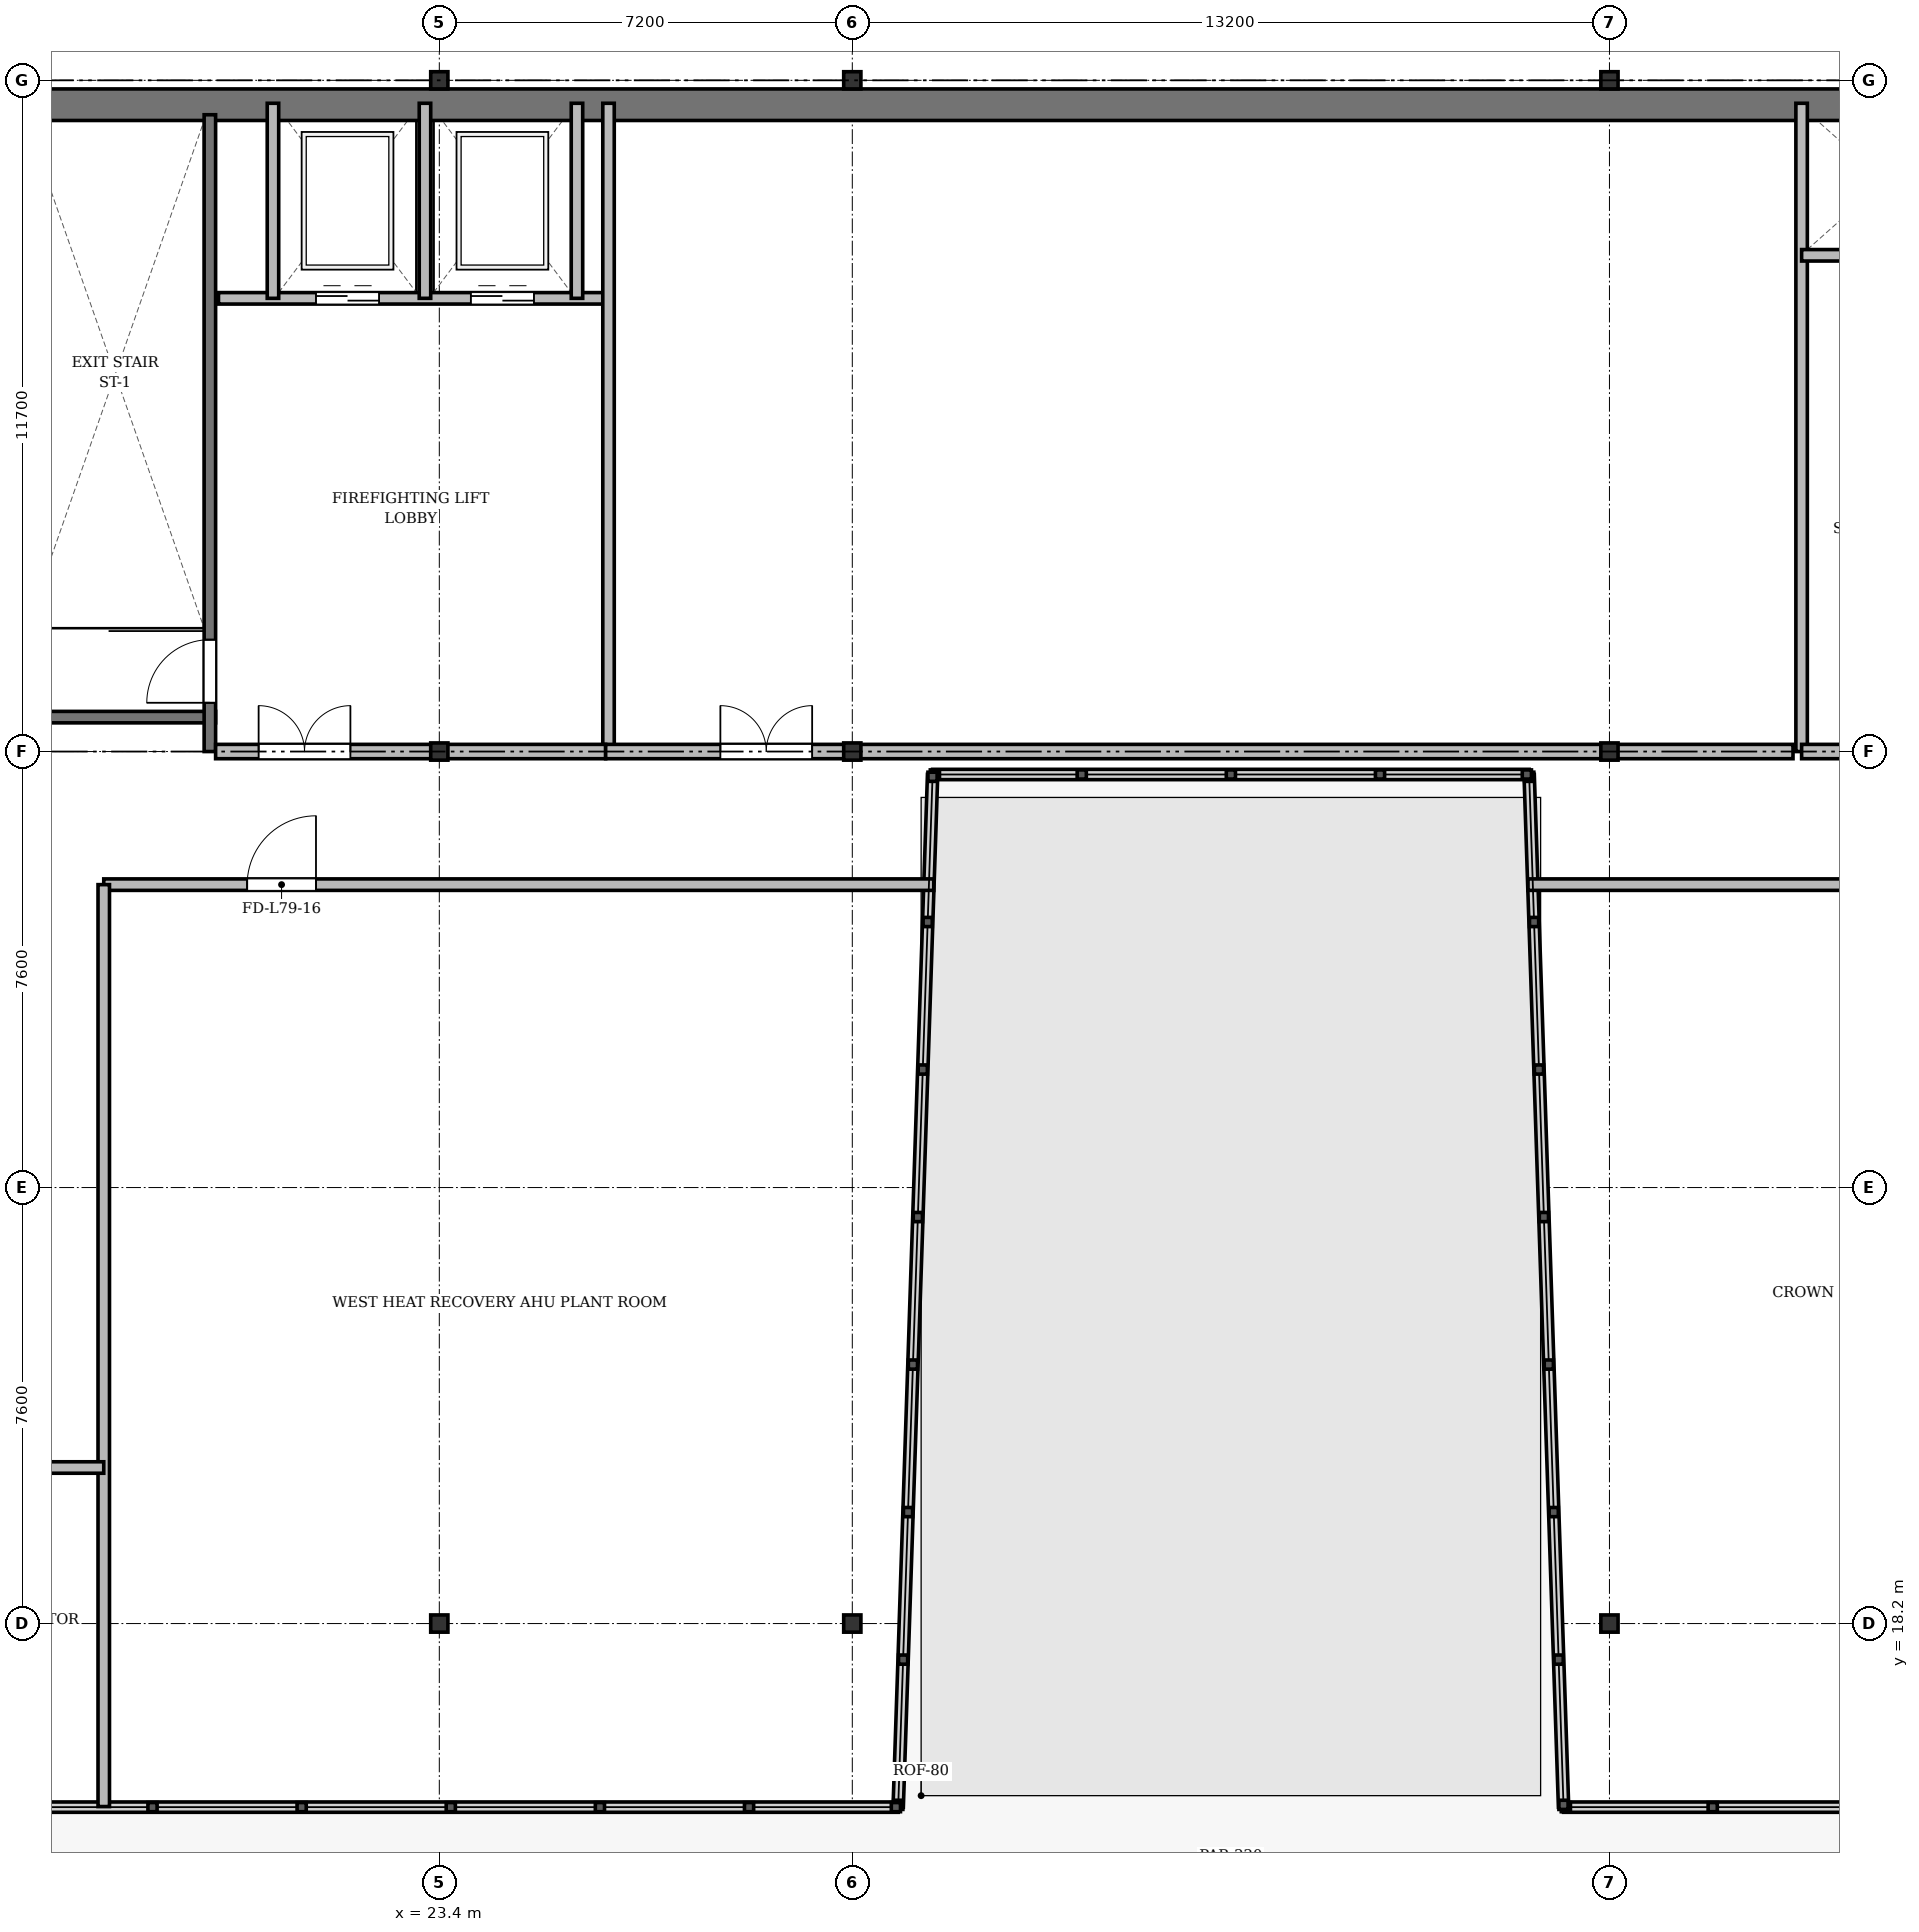
"""IFC4 building model, lengths in metres.
Left out: names, types, materials, properties, quantities, classifications, styles, units other than length and angle.
Written with IfcOpenShell. Run it as: python <this file> out.ifc"""

import sys

from ifc_helpers import new_model, si_unit, direction, frame, frame_2d, origin, origin_2d, place, context, subcontext, project, spatial, rectangle, i_section, extrude, source, transform, mapped, element, fill, save


model = new_model("IFC4")
c1 = context("Model", 3, precision=1e-05, world=origin(), true_north=direction((0.0, 1.0)))
c2 = subcontext(c1, "Body", "Model", "MODEL_VIEW")
j1 = project(units=[si_unit("LENGTHUNIT", "METRE"), si_unit("PLANEANGLEUNIT", "RADIAN")], contexts=[c1])
p1 = place(None, origin())
s1 = spatial("IfcSite", under=j1, at=p1, CompositionType="ELEMENT")
p2 = place(p1, origin())
s2 = spatial("IfcBuilding", under=s1, at=p2, CompositionType="ELEMENT")
p3 = place(p2, frame((0.0, 0.0, 303.5)))
s3 = spatial("IfcBuildingStorey", under=s2, at=p3, CompositionType="ELEMENT", Elevation=303.5)
m1 = source(origin(), c2, "Body", "SweptSolid", [
    extrude(i_section(OverallWidth=0.3, OverallDepth=0.3, WebThickness=0.015, FlangeThickness=0.024, at=origin_2d()), origin(), (0.0, 0.0, 1.0), 4.4),
])
for number, where, z_axis, x_axis in (
    (1, (23.4, 18.2, 0.0), (0.0, 0.0, 1.0), (1.0, 0.0, 0.0)),
    (2, (23.4, 33.4, 0.0), (0.0, 0.0, 1.0), (1.0, 0.0, 0.0)),
    (3, (23.4, 45.1, 0.0), (0.0, 0.0, 1.0), (1.0, 0.0, 0.0)),
    (4, (30.6, 18.2, 0.0), (0.0, 0.0, 1.0), (1.0, 0.0, 0.0)),
    (5, (30.6, 33.4, 0.0), (0.0, 0.0, 1.0), (1.0, 0.0, 0.0)),
    (6, (30.6, 45.1, 0.0), (0.0, 0.0, 1.0), (1.0, 0.0, 0.0)),
    (7, (43.8, 18.2, 0.0), (0.0, 0.0, 1.0), (1.0, 0.0, 0.0)),
    (8, (43.8, 33.4, 0.0), (0.0, 0.0, 1.0), (1.0, 0.0, 0.0)),
    (9, (43.8, 45.1, 0.0), (0.0, 0.0, 1.0), (1.0, 0.0, 0.0)),
):
    element("IfcColumn", number, at=place(p3, frame(where, z_axis=z_axis, x_axis=x_axis)), inside=s3, PredefinedType="COLUMN", context=c2, shape_type="MappedRepresentation", body=[
        mapped(m1, transform((0.0, 0.0, 0.0), x_axis=(1.0, 0.0, 0.0), y_axis=(0.0, 1.0, 0.0), z_axis=(0.0, 0.0, 1.0), scale=1.0)),
    ])
p4 = place(p3, frame((15.65, 44.675, 0.0), z_axis=(0.0, 0.0, 1.0), x_axis=(1.0, 0.0, 0.0)))
e10 = element("IfcWall", 10, at=p4, inside=s3, PredefinedType="SHEAR", context=c2, shape_type="SweptSolid", body=[
    extrude(rectangle(XDim=43.1, YDim=0.55, at=frame_2d((21.55, 0.0))), origin(), (0.0, 0.0, 1.0), 4.1),
])
p5 = place(p3, frame((16.1, 34.0, 0.0), z_axis=(0.0, 0.0, 1.0), x_axis=(1.0, 0.0, 0.0)))
e11 = element("IfcWall", 11, at=p5, inside=s3, PredefinedType="SHEAR", context=c2, shape_type="SweptSolid", body=[
    extrude(rectangle(XDim=3.4, YDim=0.2, at=frame_2d((1.7, 0.0))), origin(), (0.0, 0.0, 1.0), 4.1),
])
p6 = place(p3, frame((19.4, 33.4, 0.0), z_axis=(0.0, 0.0, 1.0), x_axis=(0.0, 1.0, 0.0)))
e12 = element("IfcWall", 12, at=p6, inside=s3, PredefinedType="SHEAR", context=c2, shape_type="SweptSolid", body=[
    extrude(rectangle(XDim=11.1, YDim=0.2, at=frame_2d((5.55, 0.0))), origin(), (0.0, 0.0, 1.0), 4.1),
])
p7 = place(p6, frame((0.85, 0.0, 0.0)))
e13 = element("IfcOpeningElement", 13, at=p7, cuts=e12, PredefinedType="OPENING", context=c2, shape_type="SweptSolid", body=[
    extrude(rectangle(XDim=1.1, YDim=2.15, at=frame_2d((0.55, 1.075))), frame((0.0, 0.11, 0.0), z_axis=(0.0, -1.0, 0.0), x_axis=(1.0, 0.0, 0.0)), (0.0, 0.0, 1.0), 0.22),
])
p8 = place(p3, frame((19.55, 41.3, 0.0), z_axis=(0.0, 0.0, 1.0), x_axis=(1.0, 0.0, 0.0)))
e14 = element("IfcWall", 14, at=p8, inside=s3, PredefinedType="SOLIDWALL", context=c2, shape_type="SweptSolid", body=[
    extrude(rectangle(XDim=6.75, YDim=0.2, at=frame_2d((3.375, 0.0))), origin(), (0.0, 0.0, 1.0), 4.1),
])
p9 = place(p8, frame((1.7, 0.0, 0.0)))
e15 = element("IfcOpeningElement", 15, at=p9, cuts=e14, PredefinedType="OPENING", context=c2, shape_type="SweptSolid", body=[
    extrude(rectangle(XDim=1.1, YDim=2.15, at=frame_2d((0.55, 1.075))), frame((0.0, 0.11, 0.0), z_axis=(0.0, -1.0, 0.0), x_axis=(1.0, 0.0, 0.0)), (0.0, 0.0, 1.0), 0.22),
])
p10 = place(p8, frame((4.4, 0.0, 0.0)))
e16 = element("IfcOpeningElement", 16, at=p10, cuts=e14, PredefinedType="OPENING", context=c2, shape_type="SweptSolid", body=[
    extrude(rectangle(XDim=1.1, YDim=2.15, at=frame_2d((0.55, 1.075))), frame((0.0, 0.11, 0.0), z_axis=(0.0, -1.0, 0.0), x_axis=(1.0, 0.0, 0.0)), (0.0, 0.0, 1.0), 0.22),
])
for number, where, z_axis, x_axis in (
    (17, (20.5, 41.3, 0.0), (0.0, 0.0, 1.0), (0.0, 1.0, 0.0)),
    (18, (23.15, 41.3, 0.0), (0.0, 0.0, 1.0), (0.0, 1.0, 0.0)),
    (19, (25.8, 41.3, 0.0), (0.0, 0.0, 1.0), (0.0, 1.0, 0.0)),
):
    element("IfcWall", number, at=place(p3, frame(where, z_axis=z_axis, x_axis=x_axis)), inside=s3, PredefinedType="SOLIDWALL", context=c2, shape_type="SweptSolid", body=[
        extrude(rectangle(XDim=3.4, YDim=0.2, at=frame_2d((1.7, 0.0))), origin(), (0.0, 0.0, 1.0), 4.1),
    ])
p11 = place(p3, frame((26.35, 33.4, 0.0), z_axis=(0.0, 0.0, 1.0), x_axis=(0.0, 1.0, 0.0)))
e20 = element("IfcWall", 20, at=p11, inside=s3, PredefinedType="SOLIDWALL", context=c2, shape_type="SweptSolid", body=[
    extrude(rectangle(XDim=11.3, YDim=0.2, at=frame_2d((5.65, 0.0))), origin(), (0.0, 0.0, 1.0), 3.6),
])
p12 = place(p3, frame((19.5, 33.4, 0.0), z_axis=(0.0, 0.0, 1.0), x_axis=(1.0, 0.0, 0.0)))
e21 = element("IfcWall", 21, at=p12, inside=s3, PredefinedType="PARTITIONING", context=c2, shape_type="SweptSolid", body=[
    extrude(rectangle(XDim=6.8, YDim=0.25, at=frame_2d((3.4, 0.0))), origin(), (0.0, 0.0, 1.0), 3.6),
])
p13 = place(p12, frame((0.75, 0.0, 0.0)))
e22 = element("IfcOpeningElement", 22, at=p13, cuts=e21, PredefinedType="OPENING", context=c2, shape_type="SweptSolid", body=[
    extrude(rectangle(XDim=1.6, YDim=2.2, at=frame_2d((0.8, 1.1))), frame((0.0, 0.135, 0.0), z_axis=(0.0, -1.0, 0.0), x_axis=(1.0, 0.0, 0.0)), (0.0, 0.0, 1.0), 0.27),
])
p14 = place(p3, frame((26.3, 33.4, 0.0), z_axis=(0.0, 0.0, 1.0), x_axis=(1.0, 0.0, 0.0)))
e23 = element("IfcWall", 23, at=p14, inside=s3, PredefinedType="PARTITIONING", context=c2, shape_type="SweptSolid", body=[
    extrude(rectangle(XDim=20.7, YDim=0.25, at=frame_2d((10.35, 0.0))), origin(), (0.0, 0.0, 1.0), 3.6),
])
p15 = place(p14, frame((2.0, 0.0, 0.0)))
e24 = element("IfcOpeningElement", 24, at=p15, cuts=e23, PredefinedType="OPENING", context=c2, shape_type="SweptSolid", body=[
    extrude(rectangle(XDim=1.6, YDim=2.2, at=frame_2d((0.8, 1.1))), frame((0.0, 0.135, 0.0), z_axis=(0.0, -1.0, 0.0), x_axis=(1.0, 0.0, 0.0)), (0.0, 0.0, 1.0), 0.27),
])
p16 = place(p3, frame((47.15, 33.4, 0.0), z_axis=(0.0, 0.0, 1.0), x_axis=(0.0, 1.0, 0.0)))
e25 = element("IfcWall", 25, at=p16, inside=s3, PredefinedType="SOLIDWALL", context=c2, shape_type="SweptSolid", body=[
    extrude(rectangle(XDim=11.3, YDim=0.2, at=frame_2d((5.65, 0.0))), origin(), (0.0, 0.0, 1.0), 3.6),
])
p17 = place(p3, frame((47.15, 42.05, 0.0), z_axis=(0.0, 0.0, 1.0), x_axis=(1.0, 0.0, 0.0)))
e26 = element("IfcWall", 26, at=p17, inside=s3, PredefinedType="SOLIDWALL", context=c2, shape_type="SweptSolid", body=[
    extrude(rectangle(XDim=7.85, YDim=0.2, at=frame_2d((3.925, 0.0))), origin(), (0.0, 0.0, 1.0), 3.6),
])
p18 = place(p17, frame((0.75, 0.0, 0.0)))
e27 = element("IfcOpeningElement", 27, at=p18, cuts=e26, PredefinedType="OPENING", context=c2, shape_type="SweptSolid", body=[
    extrude(rectangle(XDim=0.9, YDim=2.1, at=frame_2d((0.45, 1.05))), frame((0.0, 0.11, 0.0), z_axis=(0.0, -1.0, 0.0), x_axis=(1.0, 0.0, 0.0)), (0.0, 0.0, 1.0), 0.22),
])
p19 = place(p17, frame((3.85, 0.0, 0.0)))
e28 = element("IfcOpeningElement", 28, at=p19, cuts=e26, PredefinedType="OPENING", context=c2, shape_type="SweptSolid", body=[
    extrude(rectangle(XDim=0.9, YDim=2.1, at=frame_2d((0.45, 1.05))), frame((0.0, 0.11, 0.0), z_axis=(0.0, -1.0, 0.0), x_axis=(1.0, 0.0, 0.0)), (0.0, 0.0, 1.0), 0.22),
])
p20 = place(p3, frame((47.15, 33.4, 0.0), z_axis=(0.0, 0.0, 1.0), x_axis=(1.0, 0.0, 0.0)))
e29 = element("IfcWall", 29, at=p20, inside=s3, PredefinedType="PARTITIONING", context=c2, shape_type="SweptSolid", body=[
    extrude(rectangle(XDim=11.15, YDim=0.25, at=frame_2d((5.575, 0.0))), origin(), (0.0, 0.0, 1.0), 3.6),
])
p21 = place(p20, frame((0.7, 0.0, 0.0)))
e30 = element("IfcOpeningElement", 30, at=p21, cuts=e29, PredefinedType="OPENING", context=c2, shape_type="SweptSolid", body=[
    extrude(rectangle(XDim=0.95, YDim=2.15, at=frame_2d((0.475, 1.075))), frame((0.0, 0.135, 0.0), z_axis=(0.0, -1.0, 0.0), x_axis=(1.0, 0.0, 0.0)), (0.0, 0.0, 1.0), 0.27),
])
p22 = place(p20, frame((6.0, 0.0, 0.0)))
e31 = element("IfcOpeningElement", 31, at=p22, cuts=e29, PredefinedType="OPENING", context=c2, shape_type="SweptSolid", body=[
    extrude(rectangle(XDim=1.2, YDim=2.15, at=frame_2d((0.6, 1.075))), frame((0.0, 0.135, 0.0), z_axis=(0.0, -1.0, 0.0), x_axis=(1.0, 0.0, 0.0)), (0.0, 0.0, 1.0), 0.27),
])
p23 = place(p3, frame((17.55, 31.08, 0.0), z_axis=(0.0, 0.0, 1.0), x_axis=(1.0, 0.0, 0.0)))
e32 = element("IfcWall", 32, at=p23, inside=s3, PredefinedType="PARTITIONING", context=c2, shape_type="SweptSolid", body=[
    extrude(rectangle(XDim=14.47, YDim=0.2, at=frame_2d((7.235, 0.0))), origin(), (0.0, 0.0, 1.0), 3.6),
])
p24 = place(p23, frame((2.5, 0.0, 0.0)))
e33 = element("IfcOpeningElement", 33, at=p24, cuts=e32, PredefinedType="OPENING", context=c2, shape_type="SweptSolid", body=[
    extrude(rectangle(XDim=1.2, YDim=2.15, at=frame_2d((0.6, 1.075))), frame((0.0, 0.11, 0.0), z_axis=(0.0, -1.0, 0.0), x_axis=(1.0, 0.0, 0.0)), (0.0, 0.0, 1.0), 0.22),
])
p25 = place(p3, frame((42.38, 31.08, 0.0), z_axis=(0.0, 0.0, 1.0), x_axis=(1.0, 0.0, 0.0)))
e34 = element("IfcWall", 34, at=p25, inside=s3, PredefinedType="PARTITIONING", context=c2, shape_type="SweptSolid", body=[
    extrude(rectangle(XDim=14.47, YDim=0.2, at=frame_2d((7.235, 0.0))), origin(), (0.0, 0.0, 1.0), 3.6),
])
p26 = place(p25, frame((9.5, 0.0, 0.0)))
e35 = element("IfcOpeningElement", 35, at=p26, cuts=e34, PredefinedType="OPENING", context=c2, shape_type="SweptSolid", body=[
    extrude(rectangle(XDim=1.2, YDim=2.15, at=frame_2d((0.6, 1.075))), frame((0.0, 0.11, 0.0), z_axis=(0.0, -1.0, 0.0), x_axis=(1.0, 0.0, 0.0)), (0.0, 0.0, 1.0), 0.22),
])
p27 = place(p3, frame((17.55, 15.01, 0.0), z_axis=(0.0, 0.0, 1.0), x_axis=(0.0, 1.0, 0.0)))
e36 = element("IfcWall", 36, at=p27, inside=s3, PredefinedType="PARTITIONING", context=c2, shape_type="SweptSolid", body=[
    extrude(rectangle(XDim=16.07, YDim=0.2, at=frame_2d((8.035, 0.0))), origin(), (0.0, 0.0, 1.0), 3.6),
])
p28 = place(p3, frame((8.41, 20.92, 0.0), z_axis=(0.0, 0.0, 1.0), x_axis=(1.0, 0.0, 0.0)))
e37 = element("IfcWall", 37, at=p28, inside=s3, PredefinedType="PARTITIONING", context=c2, shape_type="SweptSolid", body=[
    extrude(rectangle(XDim=9.14, YDim=0.2, at=frame_2d((4.57, 0.0))), origin(), (0.0, 0.0, 1.0), 3.6),
])
p29 = place(p28, frame((4.5, 0.0, 0.0)))
e38 = element("IfcOpeningElement", 38, at=p29, cuts=e37, PredefinedType="OPENING", context=c2, shape_type="SweptSolid", body=[
    extrude(rectangle(XDim=1.2, YDim=2.15, at=frame_2d((0.6, 1.075))), frame((0.0, 0.11, 0.0), z_axis=(0.0, -1.0, 0.0), x_axis=(1.0, 0.0, 0.0)), (0.0, 0.0, 1.0), 0.22),
])
m2 = source(origin(), c2, "Body", "SweptSolid", [
    extrude(rectangle(XDim=1.1, YDim=2.15, at=frame_2d((0.55, 1.075))), frame((0.0, 0.025, 0.0), z_axis=(0.0, -1.0, 0.0), x_axis=(1.0, 0.0, 0.0)), (0.0, 0.0, 1.0), 0.05),
])
p30 = place(p7, origin())
e39 = element("IfcDoor", 39, at=p30, inside=s3, OperationType="SINGLE_SWING_LEFT", PredefinedType="DOOR", context=c2, shape_type="MappedRepresentation", body=[
    mapped(m2, transform((0.0, 0.0, 0.0), x_axis=(1.0, 0.0, 0.0), y_axis=(0.0, 1.0, 0.0), z_axis=(0.0, 0.0, 1.0), scale=1.0)),
])
fill(e13, e39)
p31 = place(p9, origin())
e40 = element("IfcDoor", 40, at=p31, inside=s3, OperationType="DOUBLE_DOOR_SLIDING", PredefinedType="DOOR", context=c2, shape_type="MappedRepresentation", body=[
    mapped(m2, transform((0.0, 0.0, 0.0), x_axis=(1.0, 0.0, 0.0), y_axis=(0.0, 1.0, 0.0), z_axis=(0.0, 0.0, 1.0), scale=1.0)),
])
fill(e15, e40)
p32 = place(p10, origin())
e41 = element("IfcDoor", 41, at=p32, inside=s3, OperationType="DOUBLE_DOOR_SLIDING", PredefinedType="DOOR", context=c2, shape_type="MappedRepresentation", body=[
    mapped(m2, transform((0.0, 0.0, 0.0), x_axis=(1.0, 0.0, 0.0), y_axis=(0.0, 1.0, 0.0), z_axis=(0.0, 0.0, 1.0), scale=1.0)),
])
fill(e16, e41)
m3 = source(origin(), c2, "Body", "SweptSolid", [
    extrude(rectangle(XDim=1.6, YDim=2.2, at=frame_2d((0.8, 1.1))), frame((0.0, 0.025, 0.0), z_axis=(0.0, -1.0, 0.0), x_axis=(1.0, 0.0, 0.0)), (0.0, 0.0, 1.0), 0.05),
])
p33 = place(p13, origin())
e42 = element("IfcDoor", 42, at=p33, inside=s3, OperationType="DOUBLE_DOOR_SINGLE_SWING", PredefinedType="DOOR", context=c2, shape_type="MappedRepresentation", body=[
    mapped(m3, transform((0.0, 0.0, 0.0), x_axis=(1.0, 0.0, 0.0), y_axis=(0.0, 1.0, 0.0), z_axis=(0.0, 0.0, 1.0), scale=1.0)),
])
fill(e22, e42)
p34 = place(p15, origin())
e43 = element("IfcDoor", 43, at=p34, inside=s3, OperationType="DOUBLE_DOOR_SINGLE_SWING", PredefinedType="DOOR", context=c2, shape_type="MappedRepresentation", body=[
    mapped(m3, transform((0.0, 0.0, 0.0), x_axis=(1.0, 0.0, 0.0), y_axis=(0.0, 1.0, 0.0), z_axis=(0.0, 0.0, 1.0), scale=1.0)),
])
fill(e24, e43)
m4 = source(origin(), c2, "Body", "SweptSolid", [
    extrude(rectangle(XDim=1.2, YDim=2.15, at=frame_2d((0.6, 1.075))), frame((0.0, 0.025, 0.0), z_axis=(0.0, -1.0, 0.0), x_axis=(1.0, 0.0, 0.0)), (0.0, 0.0, 1.0), 0.05),
])
p35 = place(p24, origin())
e44 = element("IfcDoor", 44, at=p35, inside=s3, OperationType="SINGLE_SWING_RIGHT", PredefinedType="DOOR", context=c2, shape_type="MappedRepresentation", body=[
    mapped(m4, transform((0.0, 0.0, 0.0), x_axis=(1.0, 0.0, 0.0), y_axis=(0.0, 1.0, 0.0), z_axis=(0.0, 0.0, 1.0), scale=1.0)),
])
fill(e33, e44)
save(model, sys.argv[1])
